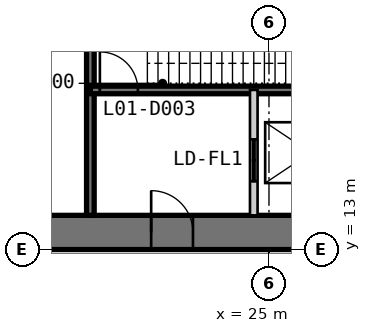
"""IFC4 building model, lengths in metres.
Left out: names, types, materials, properties, quantities, classifications, styles, units other than length and angle.
Written with IfcOpenShell. Run it as: python <this file> out.ifc"""

import sys

from ifc_helpers import new_model, si_unit, direction, frame, frame_2d, origin, place, context, subcontext, project, spatial, polyline, rectangle, outline, extrude, element, fill, save


model = new_model("IFC4")
c1 = context("Model", 3, precision=1e-05, world=origin(), true_north=direction((0.0, 1.0)))
c2 = subcontext(c1, "Body", "Model", "MODEL_VIEW")
j1 = project(units=[si_unit("LENGTHUNIT", "METRE"), si_unit("PLANEANGLEUNIT", "RADIAN")], contexts=[c1])
p1 = place(None, origin())
s1 = spatial("IfcSite", under=j1, at=p1, CompositionType="ELEMENT")
p2 = place(p1, origin())
s2 = spatial("IfcBuilding", under=s1, at=p2, CompositionType="ELEMENT")
p3 = place(p2, frame((0.0, 0.0, 7.0)))
s3 = spatial("IfcBuildingStorey", under=s2, at=p3, CompositionType="ELEMENT", Elevation=7.0)
p4 = place(p3, frame((13.0, 13.45, 0.0), z_axis=(0.0, 0.0, 1.0), x_axis=(1.0, 0.0, 0.0)))
e1 = element("IfcWall", 1, at=p4, inside=s3, PredefinedType="SHEAR", context=c2, shape_type="SweptSolid", body=[
    extrude(outline(polyline([(0.0, -0.45), (24.0, -0.45), (23.1, 0.45), (0.9, 0.45), (0.0, -0.45)])), origin(), (0.0, 0.0, 1.0), 4.8),
])
p5 = place(p4, frame((4.9, 0.0, 0.0)))
e2 = element("IfcOpeningElement", 2, at=p5, cuts=e1, PredefinedType="OPENING", context=c2, shape_type="SweptSolid", body=[
    extrude(rectangle(XDim=1.0, YDim=2.2, at=frame_2d((0.5, 1.1))), frame((0.0, 0.46, 0.0), z_axis=(0.0, -1.0, 0.0), x_axis=(1.0, 0.0, 0.0)), (0.0, 0.0, 1.0), 0.92),
])
p6 = place(p4, frame((8.9, 0.0, 0.0)))
e3 = element("IfcOpeningElement", 3, at=p6, cuts=e1, PredefinedType="OPENING", context=c2, shape_type="SweptSolid", body=[
    extrude(rectangle(XDim=1.1, YDim=2.2, at=frame_2d((0.55, 1.1))), frame((0.0, 0.46, 0.0), z_axis=(0.0, -1.0, 0.0), x_axis=(1.0, 0.0, 0.0)), (0.0, 0.0, 1.0), 0.92),
])
p7 = place(p4, frame((15.05, 0.0, 0.0)))
e4 = element("IfcOpeningElement", 4, at=p7, cuts=e1, PredefinedType="OPENING", context=c2, shape_type="SweptSolid", body=[
    extrude(rectangle(XDim=0.9, YDim=2.2, at=frame_2d((0.45, 1.1))), frame((0.0, 0.46, 0.0), z_axis=(0.0, -1.0, 0.0), x_axis=(1.0, 0.0, 0.0)), (0.0, 0.0, 1.0), 0.92),
])
p8 = place(p4, frame((17.9, 0.0, 0.0)))
e5 = element("IfcOpeningElement", 5, at=p8, cuts=e1, PredefinedType="OPENING", context=c2, shape_type="SweptSolid", body=[
    extrude(rectangle(XDim=1.0, YDim=2.2, at=frame_2d((0.5, 1.1))), frame((0.0, 0.46, 0.0), z_axis=(0.0, -1.0, 0.0), x_axis=(1.0, 0.0, 0.0)), (0.0, 0.0, 1.0), 0.92),
])
p9 = place(p4, frame((21.4, 0.0, 0.0)))
e6 = element("IfcOpeningElement", 6, at=p9, cuts=e1, PredefinedType="OPENING", context=c2, shape_type="SweptSolid", body=[
    extrude(rectangle(XDim=1.0, YDim=2.2, at=frame_2d((0.5, 1.1))), frame((0.0, 0.46, 0.0), z_axis=(0.0, -1.0, 0.0), x_axis=(1.0, 0.0, 0.0)), (0.0, 0.0, 1.0), 0.92),
])
p10 = place(p3, frame((20.3, 13.9, 0.0), z_axis=(0.0, 0.0, 1.0), x_axis=(0.0, 1.0, 0.0)))
e7 = element("IfcWall", 7, at=p10, inside=s3, PredefinedType="SOLIDWALL", context=c2, shape_type="SweptSolid", body=[
    extrude(rectangle(XDim=16.1, YDim=0.2, at=frame_2d((8.05, 0.0))), origin(), (0.0, 0.0, 1.0), 4.6),
])
p11 = place(p3, frame((20.3, 17.2, 0.0), z_axis=(0.0, 0.0, 1.0), x_axis=(1.0, 0.0, 0.0)))
e8 = element("IfcWall", 8, at=p11, inside=s3, PredefinedType="SOLIDWALL", context=c2, shape_type="SweptSolid", body=[
    extrude(rectangle(XDim=9.4, YDim=0.2, at=frame_2d((4.7, 0.0))), origin(), (0.0, 0.0, 1.0), 4.6),
])
p12 = place(p11, frame((0.25, 0.0, 0.0)))
e9 = element("IfcOpeningElement", 9, at=p12, cuts=e8, PredefinedType="OPENING", context=c2, shape_type="SweptSolid", body=[
    extrude(rectangle(XDim=1.0, YDim=2.2, at=frame_2d((0.5, 1.1))), frame((0.0, 0.11, 0.0), z_axis=(0.0, -1.0, 0.0), x_axis=(1.0, 0.0, 0.0)), (0.0, 0.0, 1.0), 0.22),
])
p13 = place(p3, frame((24.6, 13.9, 0.0), z_axis=(0.0, 0.0, 1.0), x_axis=(0.0, 1.0, 0.0)))
e10 = element("IfcWall", 10, at=p13, inside=s3, PredefinedType="PARTITIONING", context=c2, shape_type="SweptSolid", body=[
    extrude(rectangle(XDim=3.3, YDim=0.2, at=frame_2d((1.65, 0.0))), origin(), (0.0, 0.0, 1.0), 4.6),
])
p14 = place(p13, frame((0.9, 0.0, 0.0)))
e11 = element("IfcOpeningElement", 11, at=p14, cuts=e10, PredefinedType="OPENING", context=c2, shape_type="SweptSolid", body=[
    extrude(rectangle(XDim=1.1, YDim=2.2, at=frame_2d((0.55, 1.1))), frame((0.0, 0.11, 0.0), z_axis=(0.0, -1.0, 0.0), x_axis=(1.0, 0.0, 0.0)), (0.0, 0.0, 1.0), 0.22),
])
p15 = place(p6, origin())
e12 = element("IfcDoor", 12, at=p15, inside=s3, OperationType="SINGLE_SWING_LEFT", PredefinedType="DOOR", context=c2, shape_type="SweptSolid", body=[
    extrude(rectangle(XDim=1.1, YDim=2.2, at=frame_2d((0.55, 1.1))), frame((0.0, 0.025, 0.0), z_axis=(0.0, -1.0, 0.0), x_axis=(1.0, 0.0, 0.0)), (0.0, 0.0, 1.0), 0.05),
    extrude(outline(polyline([(0.0, 0.0), (0.04, 0.0), (0.04, 2.16), (1.06, 2.16), (1.06, 0.0), (1.1, 0.0), (1.1, 2.2), (0.0, 2.2), (0.0, 0.0)])), frame((0.0, 0.3, 0.0), z_axis=(0.0, -1.0, 0.0), x_axis=(1.0, 0.0, 0.0)), (0.0, 0.0, 1.0), 0.6),
])
fill(e3, e12)
p16 = place(p12, origin())
e13 = element("IfcDoor", 13, at=p16, inside=s3, OperationType="SINGLE_SWING_LEFT", PredefinedType="DOOR", context=c2, shape_type="SweptSolid", body=[
    extrude(rectangle(XDim=1.0, YDim=2.2, at=frame_2d((0.5, 1.1))), frame((0.0, 0.025, 0.0), z_axis=(0.0, -1.0, 0.0), x_axis=(1.0, 0.0, 0.0)), (0.0, 0.0, 1.0), 0.05),
])
fill(e9, e13)
p17 = place(p14, origin())
e14 = element("IfcDoor", 14, at=p17, inside=s3, OperationType="DOUBLE_DOOR_SLIDING", PredefinedType="DOOR", context=c2, shape_type="SweptSolid", body=[
    extrude(rectangle(XDim=1.1, YDim=2.2, at=frame_2d((0.55, 1.1))), frame((0.0, 0.025, 0.0), z_axis=(0.0, -1.0, 0.0), x_axis=(1.0, 0.0, 0.0)), (0.0, 0.0, 1.0), 0.05),
])
fill(e11, e14)
save(model, sys.argv[1])
